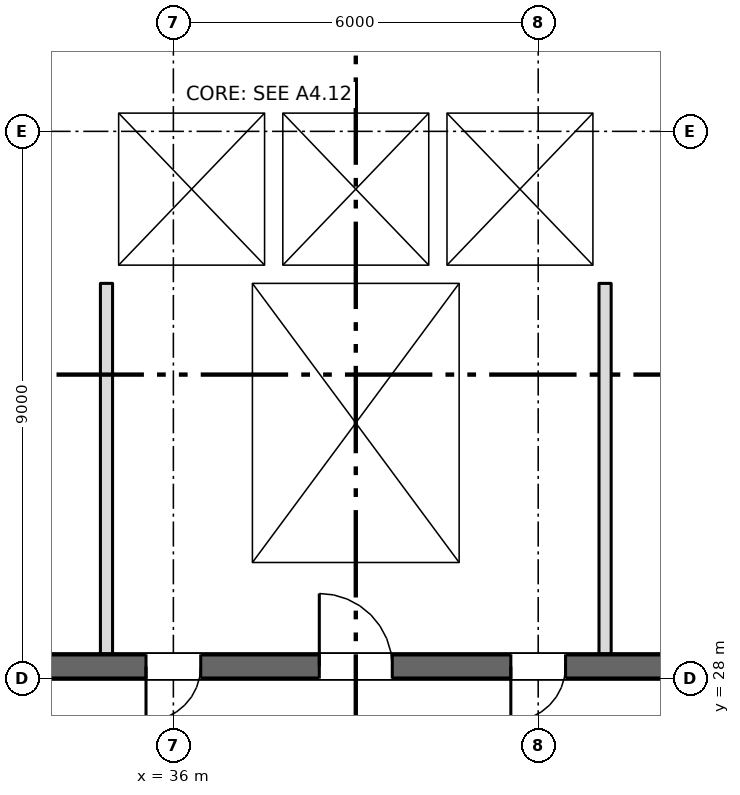
"""IFC4 building model, lengths in metres.
Left out: names, types, materials, properties, quantities, classifications, styles, units other than length and angle.
Written with IfcOpenShell. Run it as: python <this file> out.ifc"""

import sys

from ifc_helpers import new_model, si_unit, direction, frame, frame_2d, origin, place, context, subcontext, project, spatial, rectangle, extrude, element, fill, save


model = new_model("IFC4")
c1 = context("Model", 3, precision=1e-05, world=origin(), true_north=direction((0.0, 1.0)))
c2 = subcontext(c1, "Body", "Model", "MODEL_VIEW")
j1 = project(units=[si_unit("LENGTHUNIT", "METRE"), si_unit("PLANEANGLEUNIT", "RADIAN")], contexts=[c1])
p1 = place(None, origin())
s1 = spatial("IfcSite", under=j1, at=p1, CompositionType="ELEMENT")
p2 = place(p1, origin())
s2 = spatial("IfcBuilding", under=s1, at=p2, CompositionType="ELEMENT")
p3 = place(p2, frame((0.0, 0.0, 75.0)))
s3 = spatial("IfcBuildingStorey", under=s2, at=p3, CompositionType="ELEMENT", Elevation=75.0)
p4 = place(p3, frame((6.7, 28.2, 0.0), z_axis=(0.0, 0.0, 1.0), x_axis=(1.0, 0.0, 0.0)))
e1 = element("IfcWall", 1, at=p4, inside=s3, PredefinedType="SHEAR", context=c2, shape_type="SweptSolid", body=[
    extrude(rectangle(XDim=57.8, YDim=0.4, at=frame_2d((28.9, 0.0))), origin(), (0.0, 0.0, 1.0), 3.35),
])
p5 = place(p4, frame((12.062, 0.0, 0.0)))
e2 = element("IfcOpeningElement", 2, at=p5, cuts=e1, PredefinedType="OPENING", context=c2, shape_type="SweptSolid", body=[
    extrude(rectangle(XDim=0.9, YDim=2.1, at=frame_2d((0.45, 1.05))), frame((0.0, 0.21, 0.0), z_axis=(0.0, -1.0, 0.0), x_axis=(1.0, 0.0, 0.0)), (0.0, 0.0, 1.0), 0.42),
])
p6 = place(p4, frame((14.637, 0.0, 0.0)))
e3 = element("IfcOpeningElement", 3, at=p6, cuts=e1, PredefinedType="OPENING", context=c2, shape_type="SweptSolid", body=[
    extrude(rectangle(XDim=0.9, YDim=2.1, at=frame_2d((0.45, 1.05))), frame((0.0, 0.21, 0.0), z_axis=(0.0, -1.0, 0.0), x_axis=(1.0, 0.0, 0.0)), (0.0, 0.0, 1.0), 0.42),
])
p7 = place(p4, frame((49.062, 0.0, 0.0)))
e4 = element("IfcOpeningElement", 4, at=p7, cuts=e1, PredefinedType="OPENING", context=c2, shape_type="SweptSolid", body=[
    extrude(rectangle(XDim=0.9, YDim=2.1, at=frame_2d((0.45, 1.05))), frame((0.0, 0.21, 0.0), z_axis=(0.0, -1.0, 0.0), x_axis=(1.0, 0.0, 0.0)), (0.0, 0.0, 1.0), 0.42),
])
p8 = place(p4, frame((51.637, 0.0, 0.0)))
e5 = element("IfcOpeningElement", 5, at=p8, cuts=e1, PredefinedType="OPENING", context=c2, shape_type="SweptSolid", body=[
    extrude(rectangle(XDim=0.9, YDim=2.1, at=frame_2d((0.45, 1.05))), frame((0.0, 0.21, 0.0), z_axis=(0.0, -1.0, 0.0), x_axis=(1.0, 0.0, 0.0)), (0.0, 0.0, 1.0), 0.42),
])
p9 = place(p4, frame((1.35, 0.0, 0.0)))
e6 = element("IfcOpeningElement", 6, at=p9, cuts=e1, PredefinedType="OPENING", context=c2, shape_type="SweptSolid", body=[
    extrude(rectangle(XDim=0.9, YDim=2.1, at=frame_2d((0.45, 1.05))), frame((0.0, 0.21, 0.0), z_axis=(0.0, -1.0, 0.0), x_axis=(1.0, 0.0, 0.0)), (0.0, 0.0, 1.0), 0.42),
])
p10 = place(p4, frame((4.7, 0.0, 0.0)))
e7 = element("IfcOpeningElement", 7, at=p10, cuts=e1, PredefinedType="OPENING", context=c2, shape_type="SweptSolid", body=[
    extrude(rectangle(XDim=1.2, YDim=2.1, at=frame_2d((0.6, 1.05))), frame((0.0, 0.21, 0.0), z_axis=(0.0, -1.0, 0.0), x_axis=(1.0, 0.0, 0.0)), (0.0, 0.0, 1.0), 0.42),
])
p11 = place(p4, frame((31.7, 0.0, 0.0)))
e8 = element("IfcOpeningElement", 8, at=p11, cuts=e1, PredefinedType="OPENING", context=c2, shape_type="SweptSolid", body=[
    extrude(rectangle(XDim=1.2, YDim=2.1, at=frame_2d((0.6, 1.05))), frame((0.0, 0.21, 0.0), z_axis=(0.0, -1.0, 0.0), x_axis=(1.0, 0.0, 0.0)), (0.0, 0.0, 1.0), 0.42),
])
p12 = place(p4, frame((55.2, 0.0, 0.0)))
e9 = element("IfcOpeningElement", 9, at=p12, cuts=e1, PredefinedType="OPENING", context=c2, shape_type="SweptSolid", body=[
    extrude(rectangle(XDim=1.2, YDim=2.1, at=frame_2d((0.6, 1.05))), frame((0.0, 0.21, 0.0), z_axis=(0.0, -1.0, 0.0), x_axis=(1.0, 0.0, 0.0)), (0.0, 0.0, 1.0), 0.42),
])
p13 = place(p4, frame((21.7, 0.0, 0.0)))
e10 = element("IfcOpeningElement", 10, at=p13, cuts=e1, PredefinedType="OPENING", context=c2, shape_type="SweptSolid", body=[
    extrude(rectangle(XDim=1.2, YDim=2.1, at=frame_2d((0.6, 1.05))), frame((0.0, 0.21, 0.0), z_axis=(0.0, -1.0, 0.0), x_axis=(1.0, 0.0, 0.0)), (0.0, 0.0, 1.0), 0.42),
])
p14 = place(p4, frame((41.7, 0.0, 0.0)))
e11 = element("IfcOpeningElement", 11, at=p14, cuts=e1, PredefinedType="OPENING", context=c2, shape_type="SweptSolid", body=[
    extrude(rectangle(XDim=1.2, YDim=2.1, at=frame_2d((0.6, 1.05))), frame((0.0, 0.21, 0.0), z_axis=(0.0, -1.0, 0.0), x_axis=(1.0, 0.0, 0.0)), (0.0, 0.0, 1.0), 0.42),
])
p15 = place(p4, frame((24.85, 0.0, 0.0)))
e12 = element("IfcOpeningElement", 12, at=p15, cuts=e1, PredefinedType="OPENING", context=c2, shape_type="SweptSolid", body=[
    extrude(rectangle(XDim=2.4, YDim=2.1, at=frame_2d((1.2, 1.05))), frame((0.0, 0.21, 0.0), z_axis=(0.0, -1.0, 0.0), x_axis=(1.0, 0.0, 0.0)), (0.0, 0.0, 1.0), 0.42),
])
p16 = place(p4, frame((37.35, 0.0, 0.0)))
e13 = element("IfcOpeningElement", 13, at=p16, cuts=e1, PredefinedType="OPENING", context=c2, shape_type="SweptSolid", body=[
    extrude(rectangle(XDim=2.4, YDim=2.1, at=frame_2d((1.2, 1.05))), frame((0.0, 0.21, 0.0), z_axis=(0.0, -1.0, 0.0), x_axis=(1.0, 0.0, 0.0)), (0.0, 0.0, 1.0), 0.42),
])
p17 = place(p4, frame((7.85, 0.0, 0.0)))
e14 = element("IfcOpeningElement", 14, at=p17, cuts=e1, PredefinedType="OPENING", context=c2, shape_type="SweptSolid", body=[
    extrude(rectangle(XDim=2.4, YDim=2.1, at=frame_2d((1.2, 1.05))), frame((0.0, 0.21, 0.0), z_axis=(0.0, -1.0, 0.0), x_axis=(1.0, 0.0, 0.0)), (0.0, 0.0, 1.0), 0.42),
])
p18 = place(p4, frame((28.85, 0.0, 0.0)))
e15 = element("IfcOpeningElement", 15, at=p18, cuts=e1, PredefinedType="OPENING", context=c2, shape_type="SweptSolid", body=[
    extrude(rectangle(XDim=0.9, YDim=2.1, at=frame_2d((0.45, 1.05))), frame((0.0, 0.21, 0.0), z_axis=(0.0, -1.0, 0.0), x_axis=(1.0, 0.0, 0.0)), (0.0, 0.0, 1.0), 0.42),
])
p19 = place(p4, frame((34.85, 0.0, 0.0)))
e16 = element("IfcOpeningElement", 16, at=p19, cuts=e1, PredefinedType="OPENING", context=c2, shape_type="SweptSolid", body=[
    extrude(rectangle(XDim=0.9, YDim=2.1, at=frame_2d((0.45, 1.05))), frame((0.0, 0.21, 0.0), z_axis=(0.0, -1.0, 0.0), x_axis=(1.0, 0.0, 0.0)), (0.0, 0.0, 1.0), 0.42),
])
for number, where, z_axis, x_axis in (
    (17, (37.15, 28.4, 0.0), (0.0, 0.0, 1.0), (0.0, 1.0, 0.0)),
    (18, (40.85, 28.4, 0.0), (0.0, 0.0, 1.0), (0.0, 1.0, 0.0)),
):
    element("IfcWall", number, at=place(p3, frame(where, z_axis=z_axis, x_axis=x_axis)), inside=s3, PredefinedType="SHEAR", context=c2, shape_type="SweptSolid", body=[
        extrude(rectangle(XDim=6.1, YDim=0.3, at=frame_2d((3.05, 0.0))), origin(), (0.0, 0.0, 1.0), 3.35),
    ])
p20 = place(p3, frame((34.8, 34.65, 0.0), z_axis=(0.0, 0.0, 1.0), x_axis=(1.0, 0.0, 0.0)))
e19 = element("IfcWall", 19, at=p20, inside=s3, PredefinedType="SHEAR", context=c2, shape_type="SweptSolid", body=[
    extrude(rectangle(XDim=8.4, YDim=0.3, at=frame_2d((4.2, 0.0))), origin(), (0.0, 0.0, 1.0), 3.35),
])
p21 = place(p3, frame((34.8, 37.45, 0.0), z_axis=(0.0, 0.0, 1.0), x_axis=(1.0, 0.0, 0.0)))
e20 = element("IfcWall", 20, at=p21, inside=s3, PredefinedType="SHEAR", context=c2, shape_type="SweptSolid", body=[
    extrude(rectangle(XDim=8.4, YDim=0.3, at=frame_2d((4.2, 0.0))), origin(), (0.0, 0.0, 1.0), 3.35),
])
p22 = place(p21, frame((0.95, 0.0, 0.0)))
e21 = element("IfcOpeningElement", 21, at=p22, cuts=e20, PredefinedType="OPENING", context=c2, shape_type="SweptSolid", body=[
    extrude(rectangle(XDim=1.1, YDim=2.1, at=frame_2d((0.55, 1.05))), frame((0.0, 0.16, 0.0), z_axis=(0.0, -1.0, 0.0), x_axis=(1.0, 0.0, 0.0)), (0.0, 0.0, 1.0), 0.32),
])
p23 = place(p21, frame((3.65, 0.0, 0.0)))
e22 = element("IfcOpeningElement", 22, at=p23, cuts=e20, PredefinedType="OPENING", context=c2, shape_type="SweptSolid", body=[
    extrude(rectangle(XDim=1.1, YDim=2.1, at=frame_2d((0.55, 1.05))), frame((0.0, 0.16, 0.0), z_axis=(0.0, -1.0, 0.0), x_axis=(1.0, 0.0, 0.0)), (0.0, 0.0, 1.0), 0.32),
])
p24 = place(p21, frame((6.35, 0.0, 0.0)))
e23 = element("IfcOpeningElement", 23, at=p24, cuts=e20, PredefinedType="OPENING", context=c2, shape_type="SweptSolid", body=[
    extrude(rectangle(XDim=1.1, YDim=2.1, at=frame_2d((0.55, 1.05))), frame((0.0, 0.16, 0.0), z_axis=(0.0, -1.0, 0.0), x_axis=(1.0, 0.0, 0.0)), (0.0, 0.0, 1.0), 0.32),
])
for number, where, z_axis, x_axis in (
    (24, (34.95, 34.8, 0.0), (0.0, 0.0, 1.0), (0.0, 1.0, 0.0)),
    (25, (43.05, 34.8, 0.0), (0.0, 0.0, 1.0), (0.0, 1.0, 0.0)),
    (26, (37.65, 34.8, 0.0), (0.0, 0.0, 1.0), (0.0, 1.0, 0.0)),
    (27, (40.35, 34.8, 0.0), (0.0, 0.0, 1.0), (0.0, 1.0, 0.0)),
):
    element("IfcWall", number, at=place(p3, frame(where, z_axis=z_axis, x_axis=x_axis)), inside=s3, PredefinedType="SHEAR", context=c2, shape_type="SweptSolid", body=[
        extrude(rectangle(XDim=2.5, YDim=0.3, at=frame_2d((1.25, 0.0))), origin(), (0.0, 0.0, 1.0), 3.35),
    ])
for number, where, z_axis, x_axis in (
    (28, (34.9, 28.4, 0.0), (0.0, 0.0, 1.0), (0.0, 1.0, 0.0)),
    (29, (43.1, 28.4, 0.0), (0.0, 0.0, 1.0), (0.0, 1.0, 0.0)),
):
    element("IfcWall", number, at=place(p3, frame(where, z_axis=z_axis, x_axis=x_axis)), inside=s3, PredefinedType="PARTITIONING", context=c2, shape_type="SweptSolid", body=[
        extrude(rectangle(XDim=6.1, YDim=0.2, at=frame_2d((3.05, 0.0))), origin(), (0.0, 0.0, 1.0), 3.35),
    ])
p25 = place(p22, origin())
e30 = element("IfcDoor", 30, at=p25, inside=s3, OperationType="SLIDING_TO_LEFT", PredefinedType="DOOR", context=c2, shape_type="SweptSolid", body=[
    extrude(rectangle(XDim=1.1, YDim=2.1, at=frame_2d((0.55, 1.05))), frame((0.0, 0.025, 0.0), z_axis=(0.0, -1.0, 0.0), x_axis=(1.0, 0.0, 0.0)), (0.0, 0.0, 1.0), 0.05),
])
fill(e21, e30)
p26 = place(p23, origin())
e31 = element("IfcDoor", 31, at=p26, inside=s3, OperationType="SLIDING_TO_LEFT", PredefinedType="DOOR", context=c2, shape_type="SweptSolid", body=[
    extrude(rectangle(XDim=1.1, YDim=2.1, at=frame_2d((0.55, 1.05))), frame((0.0, 0.025, 0.0), z_axis=(0.0, -1.0, 0.0), x_axis=(1.0, 0.0, 0.0)), (0.0, 0.0, 1.0), 0.05),
])
fill(e22, e31)
p27 = place(p24, origin())
e32 = element("IfcDoor", 32, at=p27, inside=s3, OperationType="SLIDING_TO_LEFT", PredefinedType="DOOR", context=c2, shape_type="SweptSolid", body=[
    extrude(rectangle(XDim=1.1, YDim=2.1, at=frame_2d((0.55, 1.05))), frame((0.0, 0.025, 0.0), z_axis=(0.0, -1.0, 0.0), x_axis=(1.0, 0.0, 0.0)), (0.0, 0.0, 1.0), 0.05),
])
fill(e23, e32)
p28 = place(p11, origin())
e33 = element("IfcDoor", 33, at=p28, inside=s3, OperationType="SINGLE_SWING_LEFT", PredefinedType="DOOR", context=c2, shape_type="SweptSolid", body=[
    extrude(rectangle(XDim=1.2, YDim=2.1, at=frame_2d((0.6, 1.05))), frame((0.0, 0.025, 0.0), z_axis=(0.0, -1.0, 0.0), x_axis=(1.0, 0.0, 0.0)), (0.0, 0.0, 1.0), 0.05),
])
fill(e8, e33)
p29 = place(p18, origin())
e34 = element("IfcDoor", 34, at=p29, inside=s3, OperationType="SINGLE_SWING_LEFT", PredefinedType="DOOR", context=c2, shape_type="SweptSolid", body=[
    extrude(rectangle(XDim=0.9, YDim=2.1, at=frame_2d((0.45, 1.05))), frame((0.0, 0.025, 0.0), z_axis=(0.0, -1.0, 0.0), x_axis=(1.0, 0.0, 0.0)), (0.0, 0.0, 1.0), 0.05),
])
fill(e15, e34)
p30 = place(p19, origin())
e35 = element("IfcDoor", 35, at=p30, inside=s3, OperationType="SINGLE_SWING_LEFT", PredefinedType="DOOR", context=c2, shape_type="SweptSolid", body=[
    extrude(rectangle(XDim=0.9, YDim=2.1, at=frame_2d((0.45, 1.05))), frame((0.0, 0.025, 0.0), z_axis=(0.0, -1.0, 0.0), x_axis=(1.0, 0.0, 0.0)), (0.0, 0.0, 1.0), 0.05),
])
fill(e16, e35)
save(model, sys.argv[1])
